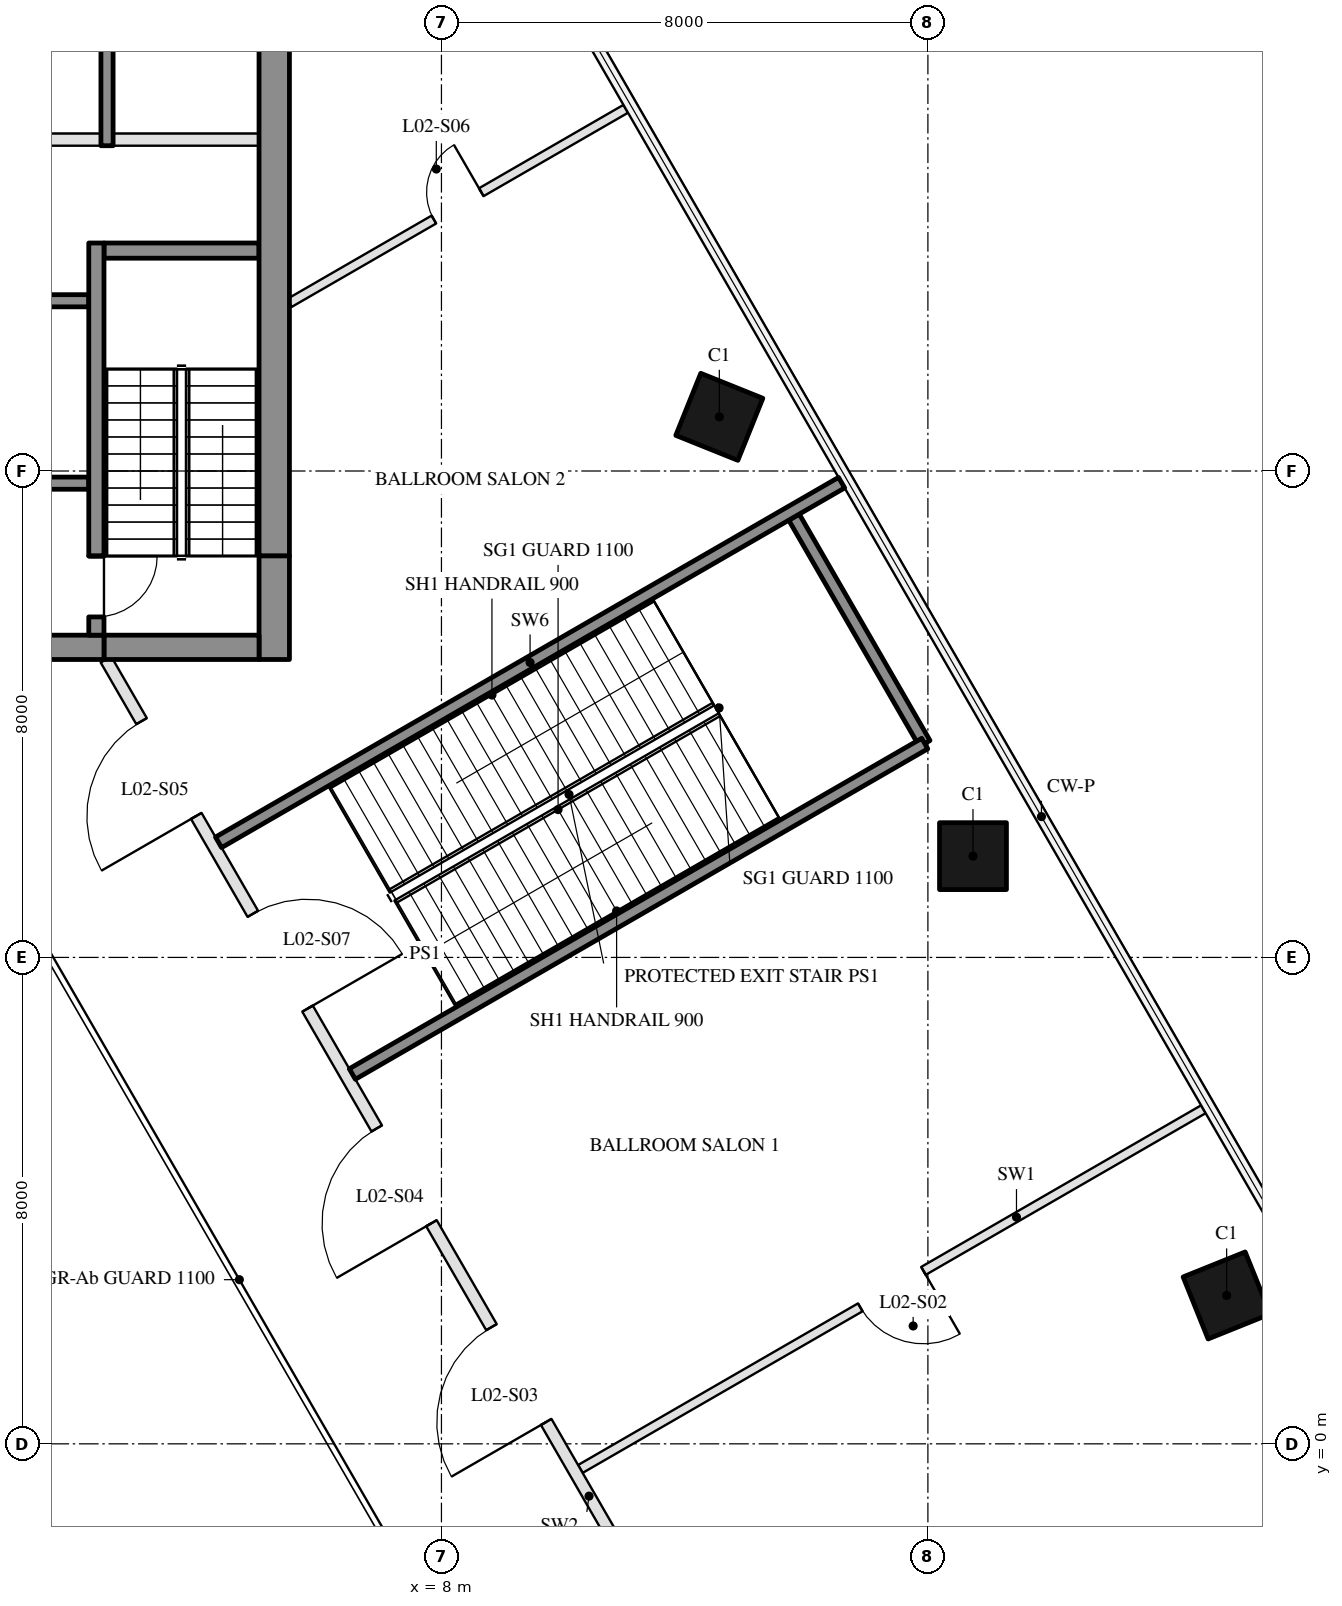
"""IFC4 building model, lengths in metres.
Left out: names, types, materials, properties, quantities, classifications, styles, units other than length and angle.
Written with IfcOpenShell. Run it as: python <this file> out.ifc"""

import sys

from ifc_helpers import new_model, si_unit, direction, frame, frame_2d, origin, origin_2d, place, context, subcontext, project, spatial, rectangle, hollow_rectangle, extrude, boolean, halfspace, element, fill, save


model = new_model("IFC4")
c1 = context("Model", 3, precision=1e-05, world=origin(), true_north=direction((0.0, 1.0)))
c2 = subcontext(c1, "Body", "Model", "MODEL_VIEW")
j1 = project(units=[si_unit("LENGTHUNIT", "METRE"), si_unit("PLANEANGLEUNIT", "RADIAN")], contexts=[c1])
p1 = place(None, origin())
s1 = spatial("IfcSite", under=j1, at=p1, CompositionType="ELEMENT")
p2 = place(p1, origin())
s2 = spatial("IfcBuilding", under=s1, at=p2, CompositionType="ELEMENT")
p3 = place(p2, frame((0.0, 0.0, 15.5)))
s3 = spatial("IfcBuildingStorey", under=s2, at=p3, CompositionType="ELEMENT", Elevation=15.5)
p4 = place(p3, frame((20.913, 2.44, 0.0), z_axis=(-0.087093940596, -0.012342108161, 0.996123645878), x_axis=(0.498471453495, -0.866283513655, 0.032849414298)))
e1 = element("IfcColumn", 1, at=p4, inside=s3, PredefinedType="COLUMN", context=c2, shape_type="SweptSolid", body=[
    boolean("DIFFERENCE", boolean("DIFFERENCE", extrude(hollow_rectangle(XDim=1.1, YDim=1.1, WallThickness=0.05, at=origin_2d()), origin(), (0.0, 0.0, 1.0), 8.031), halfspace(frame((0.0, 0.0, 0.016), z_axis=(0.0, 0.0, 1.0), x_axis=(1.0, 0.0, 0.0)), True)), halfspace(frame((0.0, 0.0, 8.017), z_axis=(0.0, 0.0, 1.0), x_axis=(1.0, 0.0, 0.0)), False)),
])
p5 = place(p3, frame((16.741, 9.666, 0.0), z_axis=(-0.070716365811, -0.040848206144, 0.996659731133), x_axis=(0.500184519903, -0.865918844956, 0.0)))
e2 = element("IfcColumn", 2, at=p5, inside=s3, PredefinedType="COLUMN", context=c2, shape_type="SweptSolid", body=[
    boolean("DIFFERENCE", boolean("DIFFERENCE", extrude(hollow_rectangle(XDim=1.1, YDim=1.1, WallThickness=0.05, at=origin_2d()), origin(), (0.0, 0.0, 1.0), 8.027), halfspace(frame((0.0, 0.0, 0.015), z_axis=(0.0, 0.0, 1.0), x_axis=(1.0, 0.0, 0.0)), True)), halfspace(frame((0.0, 0.0, 8.013), z_axis=(0.0, 0.0, 1.0), x_axis=(1.0, 0.0, 0.0)), False)),
])
p6 = place(p3, frame((12.57, 16.891, 0.0), z_axis=(-0.054232459867, -0.069219344797, 0.996126258364), x_axis=(-0.500873253526, 0.864897735693, 0.032831245724)))
e3 = element("IfcColumn", 3, at=p6, inside=s3, PredefinedType="COLUMN", context=c2, shape_type="SweptSolid", body=[
    boolean("DIFFERENCE", boolean("DIFFERENCE", extrude(hollow_rectangle(XDim=1.1, YDim=1.1, WallThickness=0.05, at=origin_2d()), origin(), (0.0, 0.0, 1.0), 8.031), halfspace(frame((0.0, 0.0, 0.016), z_axis=(0.0, 0.0, 1.0), x_axis=(1.0, 0.0, 0.0)), True)), halfspace(frame((0.0, 0.0, 8.017), z_axis=(0.0, 0.0, 1.0), x_axis=(1.0, 0.0, 0.0)), False)),
])
p7 = place(p3, frame((8.398, 24.117, 0.0), z_axis=(-0.037755622173, -0.097545474007, 0.994514652227), x_axis=(-0.501388733387, 0.862732820809, 0.065585195976)))
e4 = element("IfcColumn", 4, at=p7, inside=s3, PredefinedType="COLUMN", context=c2, shape_type="SweptSolid", body=[
    boolean("DIFFERENCE", boolean("DIFFERENCE", extrude(hollow_rectangle(XDim=1.1, YDim=1.1, WallThickness=0.05, at=origin_2d()), origin(), (0.0, 0.0, 1.0), 8.044), halfspace(frame((0.0, 0.0, 0.018), z_axis=(0.0, 0.0, 1.0), x_axis=(1.0, 0.0, 0.0)), True)), halfspace(frame((0.0, 0.0, 8.027), z_axis=(0.0, 0.0, 1.0), x_axis=(1.0, 0.0, 0.0)), False)),
])
p8 = place(p3, frame((5.0, 19.625, 0.0), z_axis=(0.0, 0.0, 1.0), x_axis=(-1.0, 0.0, 0.0)))
e5 = element("IfcWall", 5, at=p8, inside=s3, PredefinedType="SHEAR", context=c2, shape_type="SweptSolid", body=[
    extrude(rectangle(XDim=2.55, YDim=0.25, at=frame_2d((1.275, 0.0))), origin(), (0.0, 0.0, 1.0), 7.7),
])
p9 = place(p3, frame((2.2, 18.8, 0.0), z_axis=(0.0, 0.0, 1.0), x_axis=(-1.0, 0.0, 0.0)))
e6 = element("IfcWall", 6, at=p9, inside=s3, PredefinedType="SHEAR", context=c2, shape_type="SweptSolid", body=[
    extrude(rectangle(XDim=2.8, YDim=0.2, at=frame_2d((1.4, 0.0))), origin(), (0.0, 0.0, 1.0), 7.7),
])
p10 = place(p3, frame((2.2, 15.8, 0.0), z_axis=(0.0, 0.0, 1.0), x_axis=(-1.0, 0.0, 0.0)))
e7 = element("IfcWall", 7, at=p10, inside=s3, PredefinedType="SHEAR", context=c2, shape_type="SweptSolid", body=[
    extrude(rectangle(XDim=2.8, YDim=0.2, at=frame_2d((1.4, 0.0))), origin(), (0.0, 0.0, 1.0), 7.7),
])
p11 = place(p10, frame((0.7, 0.0, 0.0)))
e8 = element("IfcOpeningElement", 8, at=p11, cuts=e7, PredefinedType="OPENING", context=c2, shape_type="SweptSolid", body=[
    extrude(rectangle(XDim=1.2, YDim=2.1, at=frame_2d((0.6, 1.05))), frame((0.0, 0.11, 0.0), z_axis=(0.0, -1.0, 0.0), x_axis=(1.0, 0.0, 0.0)), (0.0, 0.0, 1.0), 0.22),
])
p12 = place(p3, frame((2.5, 21.35, 0.0), z_axis=(0.0, 0.0, 1.0), x_axis=(0.0, 1.0, 0.0)))
e9 = element("IfcWall", 9, at=p12, inside=s3, PredefinedType="SHEAR", context=c2, shape_type="SweptSolid", body=[
    extrude(rectangle(XDim=2.8, YDim=0.2, at=frame_2d((1.4, 0.0))), origin(), (0.0, 0.0, 1.0), 7.7),
])
p13 = place(p3, frame((5.0, 21.45, 0.0), z_axis=(0.0, 0.0, 1.0), x_axis=(-1.0, 0.0, 0.0)))
e10 = element("IfcWall", 10, at=p13, inside=s3, PredefinedType="PARTITIONING", context=c2, shape_type="SweptSolid", body=[
    extrude(rectangle(XDim=2.4, YDim=0.2, at=frame_2d((1.2, 0.0))), origin(), (0.0, 0.0, 1.0), 7.7),
])
p14 = place(p3, frame((2.4, 21.45, 0.0), z_axis=(0.0, 0.0, 1.0), x_axis=(-1.0, 0.0, 0.0)))
e11 = element("IfcWall", 11, at=p14, inside=s3, PredefinedType="PARTITIONING", context=c2, shape_type="SweptSolid", body=[
    extrude(rectangle(XDim=2.8, YDim=0.2, at=frame_2d((1.4, 0.0))), origin(), (0.0, 0.0, 1.0), 7.7),
])
p15 = place(p3, frame((5.25, 12.9, 0.0), z_axis=(0.0, 0.0, 1.0), x_axis=(0.0, 1.0, 0.0)))
e12 = element("IfcWall", 12, at=p15, inside=s3, PredefinedType="SHEAR", context=c2, shape_type="SweptSolid", body=[
    extrude(rectangle(XDim=1.706, YDim=0.5, at=frame_2d((0.853, 0.0))), origin(), (0.0, 0.0, 1.0), 7.7),
])
p16 = place(p3, frame((5.25, 14.606, 0.0), z_axis=(0.0, 0.0, 1.0), x_axis=(0.0, 1.0, 0.0)))
e13 = element("IfcWall", 13, at=p16, inside=s3, PredefinedType="SHEAR", context=c2, shape_type="SweptSolid", body=[
    extrude(rectangle(XDim=13.894, YDim=0.5, at=frame_2d((6.947, 0.0))), origin(), (0.0, 0.0, 1.0), 7.7),
])
p17 = place(p3, frame((5.0, 13.1, 0.0), z_axis=(0.0, 0.0, 1.0), x_axis=(-1.0, 0.0, 0.0)))
e14 = element("IfcWall", 14, at=p17, inside=s3, PredefinedType="SHEAR", context=c2, shape_type="SweptSolid", body=[
    extrude(rectangle(XDim=2.55, YDim=0.4, at=frame_2d((1.275, 0.0))), origin(), (0.0, 0.0, 1.0), 7.7),
])
p18 = place(p3, frame((2.45, 13.1, 0.0), z_axis=(0.0, 0.0, 1.0), x_axis=(-1.0, 0.0, 0.0)))
e15 = element("IfcWall", 15, at=p18, inside=s3, PredefinedType="SHEAR", context=c2, shape_type="SweptSolid", body=[
    extrude(rectangle(XDim=7.45, YDim=0.4, at=frame_2d((3.725, 0.0))), origin(), (0.0, 0.0, 1.0), 7.7),
])
p19 = place(p18, frame((1.0, 0.0, 0.0)))
e16 = element("IfcOpeningElement", 16, at=p19, cuts=e15, PredefinedType="OPENING", context=c2, shape_type="SweptSolid", body=[
    extrude(rectangle(XDim=1.1, YDim=2.1, at=frame_2d((0.55, 1.05))), frame((0.0, 0.21, 0.0), z_axis=(0.0, -1.0, 0.0), x_axis=(1.0, 0.0, 0.0)), (0.0, 0.0, 1.0), 0.42),
])
p20 = place(p18, frame((3.3, 0.0, 0.0)))
e17 = element("IfcOpeningElement", 17, at=p20, cuts=e15, PredefinedType="OPENING", context=c2, shape_type="SweptSolid", body=[
    extrude(rectangle(XDim=1.4, YDim=2.1, at=frame_2d((0.7, 1.05))), frame((0.0, 0.21, 0.0), z_axis=(0.0, -1.0, 0.0), x_axis=(1.0, 0.0, 0.0)), (0.0, 0.0, 1.0), 0.42),
])
p21 = place(p3, frame((2.325, 13.3, 0.0), z_axis=(0.0, 0.0, 1.0), x_axis=(0.0, 1.0, 0.0)))
e18 = element("IfcWall", 18, at=p21, inside=s3, PredefinedType="SHEAR", context=c2, shape_type="SweptSolid", body=[
    extrude(rectangle(XDim=1.306, YDim=0.25, at=frame_2d((0.653, 0.0))), origin(), (0.0, 0.0, 1.0), 7.7),
])
p22 = place(p21, frame((0.3, 0.0, 0.0)))
e19 = element("IfcOpeningElement", 19, at=p22, cuts=e18, PredefinedType="OPENING", context=c2, shape_type="SweptSolid", body=[
    extrude(rectangle(XDim=1.0, YDim=2.1, at=frame_2d((0.5, 1.05))), frame((0.0, 0.135, 0.0), z_axis=(0.0, -1.0, 0.0), x_axis=(1.0, 0.0, 0.0)), (0.0, 0.0, 1.0), 0.27),
])
p23 = place(p3, frame((2.325, 14.606, 0.0), z_axis=(0.0, 0.0, 1.0), x_axis=(0.0, 1.0, 0.0)))
e20 = element("IfcWall", 20, at=p23, inside=s3, PredefinedType="SHEAR", context=c2, shape_type="SweptSolid", body=[
    extrude(rectangle(XDim=5.144, YDim=0.25, at=frame_2d((2.572, 0.0))), origin(), (0.0, 0.0, 1.0), 7.7),
])
p24 = place(p3, frame((15.948, 11.517, 0.0), z_axis=(0.0, 0.0, 1.0), x_axis=(-0.499986217557, 0.866033360935, 0.0)))
e21 = element("IfcWall", 21, at=p24, inside=s3, PredefinedType="SOLIDWALL", context=c2, shape_type="SweptSolid", body=[
    extrude(rectangle(XDim=4.3, YDim=0.2, at=frame_2d((2.15, 0.0))), origin(), (0.0, 0.0, 1.0), 7.7),
])
p25 = place(p3, frame((20.531, 5.502, 0.0), z_axis=(0.0, 0.0, 1.0), x_axis=(-0.866032672044, -0.499987410794, 0.0)))
e22 = element("IfcWall", 22, at=p25, inside=s3, PredefinedType="PARTITIONING", context=c2, shape_type="SweptSolid", body=[
    extrude(rectangle(XDim=11.831, YDim=0.15, at=frame_2d((5.916, 0.0))), origin(), (0.0, 0.0, 1.0), 7.1),
])
p26 = place(p25, frame((5.316, 0.0, 0.0)))
e23 = element("IfcOpeningElement", 23, at=p26, cuts=e22, PredefinedType="OPENING", context=c2, shape_type="SweptSolid", body=[
    extrude(rectangle(XDim=1.2, YDim=2.1, at=frame_2d((0.6, 1.05))), frame((0.0, 0.085, 0.0), z_axis=(0.0, -1.0, 0.0), x_axis=(1.0, 0.0, 0.0)), (0.0, 0.0, 1.0), 0.17),
])
p27 = place(p3, frame((15.948, 11.517, 0.0), z_axis=(0.0, 0.0, 1.0), x_axis=(-0.86602026553, -0.500008899612, 0.0)))
e24 = element("IfcWall", 24, at=p27, inside=s3, PredefinedType="SOLIDWALL", context=c2, shape_type="SweptSolid", body=[
    extrude(rectangle(XDim=10.87, YDim=0.2, at=frame_2d((5.435, 0.0))), origin(), (0.0, 0.0, 1.0), 7.7),
])
p28 = place(p3, frame((14.581, 15.808, 0.0), z_axis=(0.0, 0.0, 1.0), x_axis=(-0.866032672044, -0.499987410794, 0.0)))
e25 = element("IfcWall", 25, at=p28, inside=s3, PredefinedType="SOLIDWALL", context=c2, shape_type="SweptSolid", body=[
    extrude(rectangle(XDim=11.831, YDim=0.2, at=frame_2d((5.916, 0.0))), origin(), (0.0, 0.0, 1.0), 7.7),
])
p29 = place(p3, frame((11.031, 21.957, 0.0), z_axis=(0.0, 0.0, 1.0), x_axis=(-0.866030253878, -0.499991599297, 0.0)))
e26 = element("IfcWall", 26, at=p29, inside=s3, PredefinedType="PARTITIONING", context=c2, shape_type="SweptSolid", body=[
    extrude(rectangle(XDim=6.386, YDim=0.15, at=frame_2d((3.193, 0.0))), origin(), (0.0, 0.0, 1.0), 7.1),
])
p30 = place(p29, frame((2.743, 0.0, 0.0)))
e27 = element("IfcOpeningElement", 27, at=p30, cuts=e26, PredefinedType="OPENING", context=c2, shape_type="SweptSolid", body=[
    extrude(rectangle(XDim=0.9, YDim=2.1, at=frame_2d((0.45, 1.05))), frame((0.0, 0.085, 0.0), z_axis=(0.0, -1.0, 0.0), x_axis=(1.0, 0.0, 0.0)), (0.0, 0.0, 1.0), 0.17),
])
p31 = place(p3, frame((12.413, -4.3, 0.0), z_axis=(0.0, 0.0, 1.0), x_axis=(-0.50000478328, 0.866022642139, 0.0)))
e28 = element("IfcWall", 28, at=p31, inside=s3, PredefinedType="PARTITIONING", context=c2, shape_type="SweptSolid", body=[
    extrude(rectangle(XDim=19.861, YDim=0.2, at=frame_2d((9.931, 0.0))), origin(), (0.0, 0.0, 1.0), 6.91),
])
p32 = place(p31, frame((1.634, 0.0, 0.0)))
e29 = element("IfcOpeningElement", 29, at=p32, cuts=e28, PredefinedType="OPENING", context=c2, shape_type="SweptSolid", body=[
    extrude(rectangle(XDim=1.2, YDim=2.1, at=frame_2d((0.6, 1.05))), frame((0.0, 0.11, 0.0), z_axis=(0.0, -1.0, 0.0), x_axis=(1.0, 0.0, 0.0)), (0.0, 0.0, 1.0), 0.22),
])
p33 = place(p31, frame((5.381, 0.0, 0.0)))
e30 = element("IfcOpeningElement", 30, at=p33, cuts=e28, PredefinedType="OPENING", context=c2, shape_type="SweptSolid", body=[
    extrude(rectangle(XDim=1.8, YDim=2.4, at=frame_2d((0.9, 1.2))), frame((0.0, 0.11, 0.0), z_axis=(0.0, -1.0, 0.0), x_axis=(1.0, 0.0, 0.0)), (0.0, 0.0, 1.0), 0.22),
])
p34 = place(p31, frame((9.155, 0.0, 0.0)))
e31 = element("IfcOpeningElement", 31, at=p34, cuts=e28, PredefinedType="OPENING", context=c2, shape_type="SweptSolid", body=[
    extrude(rectangle(XDim=1.8, YDim=2.4, at=frame_2d((0.9, 1.2))), frame((0.0, 0.11, 0.0), z_axis=(0.0, -1.0, 0.0), x_axis=(1.0, 0.0, 0.0)), (0.0, 0.0, 1.0), 0.22),
])
p35 = place(p31, frame((16.89, 0.0, 0.0)))
e32 = element("IfcOpeningElement", 32, at=p35, cuts=e28, PredefinedType="OPENING", context=c2, shape_type="SweptSolid", body=[
    extrude(rectangle(XDim=1.8, YDim=2.4, at=frame_2d((0.9, 1.2))), frame((0.0, 0.11, 0.0), z_axis=(0.0, -1.0, 0.0), x_axis=(1.0, 0.0, 0.0)), (0.0, 0.0, 1.0), 0.22),
])
p36 = place(p31, frame((13.23, 0.0, 0.0)))
e33 = element("IfcOpeningElement", 33, at=p36, cuts=e28, PredefinedType="OPENING", context=c2, shape_type="SweptSolid", body=[
    extrude(rectangle(XDim=1.8, YDim=2.1, at=frame_2d((0.9, 1.05))), frame((0.0, 0.11, 0.0), z_axis=(0.0, -1.0, 0.0), x_axis=(1.0, 0.0, 0.0)), (0.0, 0.0, 1.0), 0.22),
])
p37 = place(p22, frame((1.0, 0.0, 0.0), z_axis=(0.0, 0.0, 1.0), x_axis=(-1.0, 0.0, 0.0)))
e34 = element("IfcDoor", 34, at=p37, inside=s3, OperationType="SINGLE_SWING_LEFT", PredefinedType="DOOR", context=c2, shape_type="SweptSolid", body=[
    extrude(rectangle(XDim=1.0, YDim=2.1, at=frame_2d((0.5, 1.05))), frame((0.0, 0.025, 0.0), z_axis=(0.0, -1.0, 0.0), x_axis=(1.0, 0.0, 0.0)), (0.0, 0.0, 1.0), 0.05),
])
fill(e19, e34)
p38 = place(p26, origin())
e35 = element("IfcDoor", 35, at=p38, inside=s3, OperationType="SINGLE_SWING_LEFT", PredefinedType="DOOR", context=c2, shape_type="SweptSolid", body=[
    extrude(rectangle(XDim=1.2, YDim=2.1, at=frame_2d((0.6, 1.05))), frame((0.0, 0.025, 0.0), z_axis=(0.0, -1.0, 0.0), x_axis=(1.0, 0.0, 0.0)), (0.0, 0.0, 1.0), 0.05),
])
fill(e23, e35)
p39 = place(p33, origin())
e36 = element("IfcDoor", 36, at=p39, inside=s3, OperationType="DOUBLE_DOOR_SINGLE_SWING", PredefinedType="DOOR", context=c2, shape_type="SweptSolid", body=[
    extrude(rectangle(XDim=1.8, YDim=2.4, at=frame_2d((0.9, 1.2))), frame((0.0, 0.025, 0.0), z_axis=(0.0, -1.0, 0.0), x_axis=(1.0, 0.0, 0.0)), (0.0, 0.0, 1.0), 0.05),
])
fill(e30, e36)
p40 = place(p34, origin())
e37 = element("IfcDoor", 37, at=p40, inside=s3, OperationType="DOUBLE_DOOR_SINGLE_SWING", PredefinedType="DOOR", context=c2, shape_type="SweptSolid", body=[
    extrude(rectangle(XDim=1.8, YDim=2.4, at=frame_2d((0.9, 1.2))), frame((0.0, 0.025, 0.0), z_axis=(0.0, -1.0, 0.0), x_axis=(1.0, 0.0, 0.0)), (0.0, 0.0, 1.0), 0.05),
])
fill(e31, e37)
p41 = place(p35, origin())
e38 = element("IfcDoor", 38, at=p41, inside=s3, OperationType="DOUBLE_DOOR_SINGLE_SWING", PredefinedType="DOOR", context=c2, shape_type="SweptSolid", body=[
    extrude(rectangle(XDim=1.8, YDim=2.4, at=frame_2d((0.9, 1.2))), frame((0.0, 0.025, 0.0), z_axis=(0.0, -1.0, 0.0), x_axis=(1.0, 0.0, 0.0)), (0.0, 0.0, 1.0), 0.05),
])
fill(e32, e38)
p42 = place(p30, frame((0.9, 0.0, 0.0), z_axis=(0.0, 0.0, 1.0), x_axis=(-1.0, 0.0, 0.0)))
e39 = element("IfcDoor", 39, at=p42, inside=s3, OperationType="SINGLE_SWING_RIGHT", PredefinedType="DOOR", context=c2, shape_type="SweptSolid", body=[
    extrude(rectangle(XDim=0.9, YDim=2.1, at=frame_2d((0.45, 1.05))), frame((0.0, 0.025, 0.0), z_axis=(0.0, -1.0, 0.0), x_axis=(1.0, 0.0, 0.0)), (0.0, 0.0, 1.0), 0.05),
])
fill(e27, e39)
p43 = place(p36, frame((1.8, 0.0, 0.0), z_axis=(0.0, 0.0, 1.0), x_axis=(-1.0, 0.0, 0.0)))
e40 = element("IfcDoor", 40, at=p43, inside=s3, OperationType="DOUBLE_DOOR_SINGLE_SWING", PredefinedType="DOOR", context=c2, shape_type="SweptSolid", body=[
    extrude(rectangle(XDim=1.8, YDim=2.1, at=frame_2d((0.9, 1.05))), frame((0.0, 0.025, 0.0), z_axis=(0.0, -1.0, 0.0), x_axis=(1.0, 0.0, 0.0)), (0.0, 0.0, 1.0), 0.05),
])
fill(e33, e40)
save(model, sys.argv[1])
